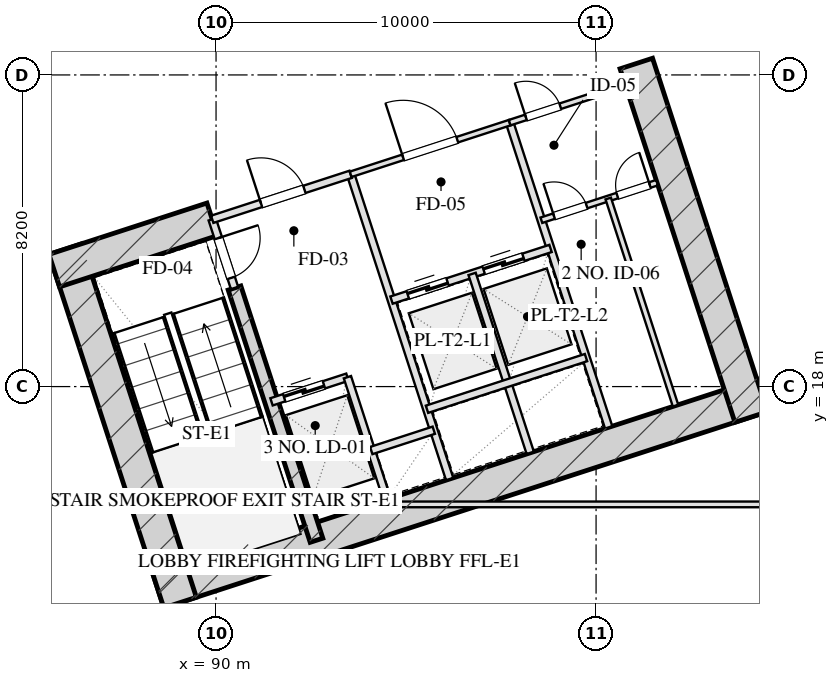
"""IFC4 building model, lengths in metres.
Left out: names, types, materials, properties, quantities, classifications, styles, units other than length and angle.
Written with IfcOpenShell. Run it as: python <this file> out.ifc"""

import sys

from ifc_helpers import new_model, si_unit, direction, frame, frame_2d, origin, place, context, subcontext, project, spatial, rectangle, extrude, element, fill, save


model = new_model("IFC4")
c1 = context("Model", 3, precision=1e-05, world=origin(), true_north=direction((0.0, 1.0)))
c2 = subcontext(c1, "Body", "Model", "MODEL_VIEW")
j1 = project(units=[si_unit("LENGTHUNIT", "METRE"), si_unit("PLANEANGLEUNIT", "RADIAN")], contexts=[c1])
p1 = place(None, origin())
s1 = spatial("IfcSite", under=j1, at=p1, CompositionType="ELEMENT")
p2 = place(p1, origin())
s2 = spatial("IfcBuilding", under=s1, at=p2, CompositionType="ELEMENT")
p3 = place(p2, frame((0.0, 0.0, 22.0)))
s3 = spatial("IfcBuildingStorey", under=s2, at=p3, CompositionType="ELEMENT", Elevation=22.0)
p4 = place(p3, frame((88.487, 12.605, 0.0), z_axis=(0.0, 0.0, 1.0), x_axis=(0.951055016115, 0.309021611416, 0.0)))
e1 = element("IfcWall", 1, at=p4, inside=s3, PredefinedType="SHEAR", context=c2, shape_type="SweptSolid", body=[
    extrude(rectangle(XDim=16.7, YDim=0.9, at=frame_2d((8.35, 0.0))), origin(), (0.0, 0.0, 1.0), 4.0),
])
p5 = place(p3, frame((86.032, 21.618, 0.0), z_axis=(0.0, 0.0, 1.0), x_axis=(0.30901438634, -0.951057363693, 0.0)))
e2 = element("IfcWall", 2, at=p5, inside=s3, PredefinedType="SHEAR", context=c2, shape_type="SweptSolid", body=[
    extrude(rectangle(XDim=9.78, YDim=0.9, at=frame_2d((4.89, 0.0))), origin(), (0.0, 0.0, 1.0), 4.0),
])
p6 = place(p3, frame((101.059, 26.5, 0.0), z_axis=(0.0, 0.0, 1.0), x_axis=(0.309021722829, -0.951054979914, 0.0)))
e3 = element("IfcWall", 3, at=p6, inside=s3, PredefinedType="SHEAR", context=c2, shape_type="SweptSolid", body=[
    extrude(rectangle(XDim=9.78, YDim=0.9, at=frame_2d((4.89, 0.0))), origin(), (0.0, 0.0, 1.0), 4.0),
])
p7 = place(p3, frame((90.486, 20.594, 0.0), z_axis=(0.0, 0.0, 1.0), x_axis=(0.309020428229, -0.951055400562, 0.0)))
e4 = element("IfcWall", 4, at=p7, inside=s3, PredefinedType="SHEAR", context=c2, shape_type="SweptSolid", body=[
    extrude(rectangle(XDim=6.98, YDim=0.35, at=frame_2d((3.49, 0.0))), origin(), (0.0, 0.0, 1.0), 4.0),
])
p8 = place(p3, frame((85.743, 21.051, 0.0), z_axis=(0.0, 0.0, 1.0), x_axis=(0.951063623806, 0.308995118848, 0.0)))
e5 = element("IfcWall", 5, at=p8, inside=s3, PredefinedType="SHEAR", context=c2, shape_type="SweptSolid", body=[
    extrude(rectangle(XDim=4.37, YDim=0.9, at=frame_2d((2.185, 0.0))), origin(), (0.0, 0.0, 1.0), 4.0),
])
p9 = place(p3, frame((89.899, 22.401, 0.0), z_axis=(0.0, 0.0, 1.0), x_axis=(0.308932062672, -0.951084108086, 0.0)))
e6 = element("IfcWall", 6, at=p9, inside=s3, PredefinedType="PARTITIONING", context=c2, shape_type="SweptSolid", body=[
    extrude(rectangle(XDim=1.9, YDim=0.2, at=frame_2d((0.95, 0.0))), origin(), (0.0, 0.0, 1.0), 3.725),
])
p10 = place(p9, frame((0.52, 0.0, 0.0)))
e7 = element("IfcOpeningElement", 7, at=p10, cuts=e6, PredefinedType="OPENING", context=c2, shape_type="SweptSolid", body=[
    extrude(rectangle(XDim=1.1, YDim=2.05, at=frame_2d((0.55, 1.025))), frame((0.0, 0.11, 0.0), z_axis=(0.0, -1.0, 0.0), x_axis=(1.0, 0.0, 0.0)), (0.0, 0.0, 1.0), 0.22),
])
p11 = place(p3, frame((93.542, 23.585, 0.0), z_axis=(0.0, 0.0, 1.0), x_axis=(0.309042196757, -0.951048327176, 0.0)))
e8 = element("IfcWall", 8, at=p11, inside=s3, PredefinedType="PARTITIONING", context=c2, shape_type="SweptSolid", body=[
    extrude(rectangle(XDim=8.43, YDim=0.2, at=frame_2d((4.215, 0.0))), origin(), (0.0, 0.0, 1.0), 3.725),
])
p12 = place(p3, frame((89.899, 22.401, 0.0), z_axis=(0.0, 0.0, 1.0), x_axis=(0.951046716504, 0.309047153403, 0.0)))
e9 = element("IfcWall", 9, at=p12, inside=s3, PredefinedType="PARTITIONING", context=c2, shape_type="SweptSolid", body=[
    extrude(rectangle(XDim=3.83, YDim=0.2, at=frame_2d((1.915, 0.0))), origin(), (0.0, 0.0, 1.0), 3.725),
])
p13 = place(p12, frame((1.35, 0.0, 0.0)))
e10 = element("IfcOpeningElement", 10, at=p13, cuts=e9, PredefinedType="OPENING", context=c2, shape_type="SweptSolid", body=[
    extrude(rectangle(XDim=1.2, YDim=2.05, at=frame_2d((0.6, 1.025))), frame((0.0, 0.11, 0.0), z_axis=(0.0, -1.0, 0.0), x_axis=(1.0, 0.0, 0.0)), (0.0, 0.0, 1.0), 0.22),
])
p14 = place(p3, frame((91.46, 17.598, 0.0), z_axis=(0.0, 0.0, 1.0), x_axis=(0.951062257173, 0.308999325213, 0.0)))
e11 = element("IfcWall", 11, at=p14, inside=s3, PredefinedType="PARTITIONING", context=c2, shape_type="SweptSolid", body=[
    extrude(rectangle(XDim=2.1, YDim=0.2, at=frame_2d((1.05, 0.0))), origin(), (0.0, 0.0, 1.0), 3.725),
])
p15 = place(p14, frame((0.35, 0.0, 0.0)))
e12 = element("IfcOpeningElement", 12, at=p15, cuts=e11, PredefinedType="OPENING", context=c2, shape_type="SweptSolid", body=[
    extrude(rectangle(XDim=1.1, YDim=2.05, at=frame_2d((0.55, 1.025))), frame((0.0, 0.11, 0.0), z_axis=(0.0, -1.0, 0.0), x_axis=(1.0, 0.0, 0.0)), (0.0, 0.0, 1.0), 0.22),
])
p16 = place(p3, frame((93.457, 18.247, 0.0), z_axis=(0.0, 0.0, 1.0), x_axis=(0.3089935693, -0.951064127245, 0.0)))
e13 = element("IfcWall", 13, at=p16, inside=s3, PredefinedType="PARTITIONING", context=c2, shape_type="SweptSolid", body=[
    extrude(rectangle(XDim=3.7, YDim=0.2, at=frame_2d((1.85, 0.0))), origin(), (0.0, 0.0, 1.0), 3.725),
])
p17 = place(p3, frame((94.084, 16.317, 0.0), z_axis=(0.0, 0.0, 1.0), x_axis=(0.951041328149, 0.309063734775, 0.0)))
e14 = element("IfcWall", 14, at=p17, inside=s3, PredefinedType="PARTITIONING", context=c2, shape_type="SweptSolid", body=[
    extrude(rectangle(XDim=1.73, YDim=0.2, at=frame_2d((0.865, 0.0))), origin(), (0.0, 0.0, 1.0), 3.725),
])
p18 = place(p3, frame((97.727, 24.944, 0.0), z_axis=(0.0, 0.0, 1.0), x_axis=(0.309016001439, -0.951056838919, 0.0)))
e15 = element("IfcWall", 15, at=p18, inside=s3, PredefinedType="PARTITIONING", context=c2, shape_type="SweptSolid", body=[
    extrude(rectangle(XDim=8.43, YDim=0.2, at=frame_2d((4.215, 0.0))), origin(), (0.0, 0.0, 1.0), 3.725),
])
p19 = place(p3, frame((93.542, 23.585, 0.0), z_axis=(0.0, 0.0, 1.0), x_axis=(0.951063829732, 0.308994485023, 0.0)))
e16 = element("IfcWall", 16, at=p19, inside=s3, PredefinedType="PARTITIONING", context=c2, shape_type="SweptSolid", body=[
    extrude(rectangle(XDim=4.4, YDim=0.15, at=frame_2d((2.2, 0.0))), origin(), (0.0, 0.0, 1.0), 3.725),
])
p20 = place(p19, frame((1.45, 0.0, 0.0)))
e17 = element("IfcOpeningElement", 17, at=p20, cuts=e16, PredefinedType="OPENING", context=c2, shape_type="SweptSolid", body=[
    extrude(rectangle(XDim=1.5, YDim=2.05, at=frame_2d((0.75, 1.025))), frame((0.0, 0.085, 0.0), z_axis=(0.0, -1.0, 0.0), x_axis=(1.0, 0.0, 0.0)), (0.0, 0.0, 1.0), 0.17),
])
p21 = place(p3, frame((94.617, 20.275, 0.0), z_axis=(0.0, 0.0, 1.0), x_axis=(0.951058531764, 0.30901079133, 0.0)))
e18 = element("IfcWall", 18, at=p21, inside=s3, PredefinedType="PARTITIONING", context=c2, shape_type="SweptSolid", body=[
    extrude(rectangle(XDim=4.4, YDim=0.2, at=frame_2d((2.2, 0.0))), origin(), (0.0, 0.0, 1.0), 3.725),
])
p22 = place(p21, frame((0.45, 0.0, 0.0)))
e19 = element("IfcOpeningElement", 19, at=p22, cuts=e18, PredefinedType="OPENING", context=c2, shape_type="SweptSolid", body=[
    extrude(rectangle(XDim=1.1, YDim=2.05, at=frame_2d((0.55, 1.025))), frame((0.0, 0.11, 0.0), z_axis=(0.0, -1.0, 0.0), x_axis=(1.0, 0.0, 0.0)), (0.0, 0.0, 1.0), 0.22),
])
p23 = place(p21, frame((2.55, 0.0, 0.0)))
e20 = element("IfcOpeningElement", 20, at=p23, cuts=e18, PredefinedType="OPENING", context=c2, shape_type="SweptSolid", body=[
    extrude(rectangle(XDim=1.1, YDim=2.05, at=frame_2d((0.55, 1.025))), frame((0.0, 0.11, 0.0), z_axis=(0.0, -1.0, 0.0), x_axis=(1.0, 0.0, 0.0)), (0.0, 0.0, 1.0), 0.22),
])
p24 = place(p3, frame((96.738, 20.964, 0.0), z_axis=(0.0, 0.0, 1.0), x_axis=(0.309042578481, -0.951048203135, 0.0)))
e21 = element("IfcWall", 21, at=p24, inside=s3, PredefinedType="PARTITIONING", context=c2, shape_type="SweptSolid", body=[
    extrude(rectangle(XDim=4.95, YDim=0.2, at=frame_2d((2.475, 0.0))), origin(), (0.0, 0.0, 1.0), 3.725),
])
p25 = place(p3, frame((95.551, 17.403, 0.0), z_axis=(0.0, 0.0, 1.0), x_axis=(0.951058531764, 0.30901079133, 0.0)))
e22 = element("IfcWall", 22, at=p25, inside=s3, PredefinedType="PARTITIONING", context=c2, shape_type="SweptSolid", body=[
    extrude(rectangle(XDim=4.4, YDim=0.2, at=frame_2d((2.2, 0.0))), origin(), (0.0, 0.0, 1.0), 3.725),
])
p26 = place(p3, frame((97.727, 24.944, 0.0), z_axis=(0.0, 0.0, 1.0), x_axis=(0.951036872128, 0.309077446369, 0.0)))
e23 = element("IfcWall", 23, at=p26, inside=s3, PredefinedType="PARTITIONING", context=c2, shape_type="SweptSolid", body=[
    extrude(rectangle(XDim=3.2, YDim=0.15, at=frame_2d((1.6, 0.0))), origin(), (0.0, 0.0, 1.0), 3.725),
])
p27 = place(p26, frame((0.45, 0.0, 0.0)))
e24 = element("IfcOpeningElement", 24, at=p27, cuts=e23, PredefinedType="OPENING", context=c2, shape_type="SweptSolid", body=[
    extrude(rectangle(XDim=0.95, YDim=2.05, at=frame_2d((0.475, 1.025))), frame((0.0, 0.085, 0.0), z_axis=(0.0, -1.0, 0.0), x_axis=(1.0, 0.0, 0.0)), (0.0, 0.0, 1.0), 0.17),
])
p28 = place(p3, frame((98.561, 22.376, 0.0), z_axis=(0.0, 0.0, 1.0), x_axis=(0.95104415986, 0.309055020985, 0.0)))
e25 = element("IfcWall", 25, at=p28, inside=s3, PredefinedType="PARTITIONING", context=c2, shape_type="SweptSolid", body=[
    extrude(rectangle(XDim=3.2, YDim=0.15, at=frame_2d((1.6, 0.0))), origin(), (0.0, 0.0, 1.0), 3.725),
])
p29 = place(p28, frame((0.35, 0.0, 0.0)))
e26 = element("IfcOpeningElement", 26, at=p29, cuts=e25, PredefinedType="OPENING", context=c2, shape_type="SweptSolid", body=[
    extrude(rectangle(XDim=0.9, YDim=2.05, at=frame_2d((0.45, 1.025))), frame((0.0, 0.085, 0.0), z_axis=(0.0, -1.0, 0.0), x_axis=(1.0, 0.0, 0.0)), (0.0, 0.0, 1.0), 0.17),
])
p30 = place(p28, frame((2.1, 0.0, 0.0)))
e27 = element("IfcOpeningElement", 27, at=p30, cuts=e25, PredefinedType="OPENING", context=c2, shape_type="SweptSolid", body=[
    extrude(rectangle(XDim=0.9, YDim=2.05, at=frame_2d((0.45, 1.025))), frame((0.0, 0.085, 0.0), z_axis=(0.0, -1.0, 0.0), x_axis=(1.0, 0.0, 0.0)), (0.0, 0.0, 1.0), 0.17),
])
p31 = place(p3, frame((100.32, 22.948, 0.0), z_axis=(0.0, 0.0, 1.0), x_axis=(0.309035009867, -0.951050662518, 0.0)))
e28 = element("IfcWall", 28, at=p31, inside=s3, PredefinedType="PARTITIONING", context=c2, shape_type="SweptSolid", body=[
    extrude(rectangle(XDim=5.73, YDim=0.15, at=frame_2d((2.865, 0.0))), origin(), (0.0, 0.0, 1.0), 3.725),
])
p32 = place(p3, frame((18.0, 14.9, 0.0), z_axis=(0.0, 0.0, 1.0), x_axis=(1.0, 0.0, 0.0)))
e29 = element("IfcWall", 29, at=p32, inside=s3, PredefinedType="PARTITIONING", context=c2, shape_type="SweptSolid", body=[
    extrude(rectangle(XDim=88.0, YDim=0.15, at=frame_2d((44.0, 0.0))), origin(), (0.0, 0.0, 1.0), 2.615),
])
p33 = place(p32, frame((21.6, 0.0, 0.0)))
e30 = element("IfcOpeningElement", 30, at=p33, cuts=e29, PredefinedType="OPENING", context=c2, shape_type="SweptSolid", body=[
    extrude(rectangle(XDim=1.5, YDim=2.05, at=frame_2d((0.75, 1.025))), frame((0.0, 0.085, 0.0), z_axis=(0.0, -1.0, 0.0), x_axis=(1.0, 0.0, 0.0)), (0.0, 0.0, 1.0), 0.17),
])
p34 = place(p10, origin())
e31 = element("IfcDoor", 31, at=p34, inside=s3, OperationType="SINGLE_SWING_LEFT", PredefinedType="DOOR", context=c2, shape_type="SweptSolid", body=[
    extrude(rectangle(XDim=1.1, YDim=2.05, at=frame_2d((0.55, 1.025))), frame((0.0, 0.025, 0.0), z_axis=(0.0, -1.0, 0.0), x_axis=(1.0, 0.0, 0.0)), (0.0, 0.0, 1.0), 0.05),
])
fill(e7, e31)
p35 = place(p13, origin())
e32 = element("IfcDoor", 32, at=p35, inside=s3, OperationType="SINGLE_SWING_LEFT", PredefinedType="DOOR", context=c2, shape_type="SweptSolid", body=[
    extrude(rectangle(XDim=1.2, YDim=2.05, at=frame_2d((0.6, 1.025))), frame((0.0, 0.025, 0.0), z_axis=(0.0, -1.0, 0.0), x_axis=(1.0, 0.0, 0.0)), (0.0, 0.0, 1.0), 0.05),
])
fill(e10, e32)
p36 = place(p15, origin())
e33 = element("IfcDoor", 33, at=p36, inside=s3, OperationType="DOUBLE_DOOR_SLIDING", PredefinedType="DOOR", context=c2, shape_type="SweptSolid", body=[
    extrude(rectangle(XDim=1.1, YDim=2.05, at=frame_2d((0.55, 1.025))), frame((0.0, 0.025, 0.0), z_axis=(0.0, -1.0, 0.0), x_axis=(1.0, 0.0, 0.0)), (0.0, 0.0, 1.0), 0.05),
])
fill(e12, e33)
p37 = place(p20, origin())
e34 = element("IfcDoor", 34, at=p37, inside=s3, OperationType="SINGLE_SWING_LEFT", PredefinedType="DOOR", context=c2, shape_type="SweptSolid", body=[
    extrude(rectangle(XDim=1.5, YDim=2.05, at=frame_2d((0.75, 1.025))), frame((0.0, 0.025, 0.0), z_axis=(0.0, -1.0, 0.0), x_axis=(1.0, 0.0, 0.0)), (0.0, 0.0, 1.0), 0.05),
])
fill(e17, e34)
p38 = place(p22, origin())
e35 = element("IfcDoor", 35, at=p38, inside=s3, OperationType="DOUBLE_DOOR_SLIDING", PredefinedType="DOOR", context=c2, shape_type="SweptSolid", body=[
    extrude(rectangle(XDim=1.1, YDim=2.05, at=frame_2d((0.55, 1.025))), frame((0.0, 0.025, 0.0), z_axis=(0.0, -1.0, 0.0), x_axis=(1.0, 0.0, 0.0)), (0.0, 0.0, 1.0), 0.05),
])
fill(e19, e35)
p39 = place(p23, origin())
e36 = element("IfcDoor", 36, at=p39, inside=s3, OperationType="DOUBLE_DOOR_SLIDING", PredefinedType="DOOR", context=c2, shape_type="SweptSolid", body=[
    extrude(rectangle(XDim=1.1, YDim=2.05, at=frame_2d((0.55, 1.025))), frame((0.0, 0.025, 0.0), z_axis=(0.0, -1.0, 0.0), x_axis=(1.0, 0.0, 0.0)), (0.0, 0.0, 1.0), 0.05),
])
fill(e20, e36)
p40 = place(p27, origin())
e37 = element("IfcDoor", 37, at=p40, inside=s3, OperationType="SINGLE_SWING_LEFT", PredefinedType="DOOR", context=c2, shape_type="SweptSolid", body=[
    extrude(rectangle(XDim=0.95, YDim=2.05, at=frame_2d((0.475, 1.025))), frame((0.0, 0.025, 0.0), z_axis=(0.0, -1.0, 0.0), x_axis=(1.0, 0.0, 0.0)), (0.0, 0.0, 1.0), 0.05),
])
fill(e24, e37)
p41 = place(p29, origin())
e38 = element("IfcDoor", 38, at=p41, inside=s3, OperationType="SINGLE_SWING_LEFT", PredefinedType="DOOR", context=c2, shape_type="SweptSolid", body=[
    extrude(rectangle(XDim=0.9, YDim=2.05, at=frame_2d((0.45, 1.025))), frame((0.0, 0.025, 0.0), z_axis=(0.0, -1.0, 0.0), x_axis=(1.0, 0.0, 0.0)), (0.0, 0.0, 1.0), 0.05),
])
fill(e26, e38)
p42 = place(p30, origin())
e39 = element("IfcDoor", 39, at=p42, inside=s3, OperationType="SINGLE_SWING_RIGHT", PredefinedType="DOOR", context=c2, shape_type="SweptSolid", body=[
    extrude(rectangle(XDim=0.9, YDim=2.05, at=frame_2d((0.45, 1.025))), frame((0.0, 0.025, 0.0), z_axis=(0.0, -1.0, 0.0), x_axis=(1.0, 0.0, 0.0)), (0.0, 0.0, 1.0), 0.05),
])
fill(e27, e39)
save(model, sys.argv[1])
